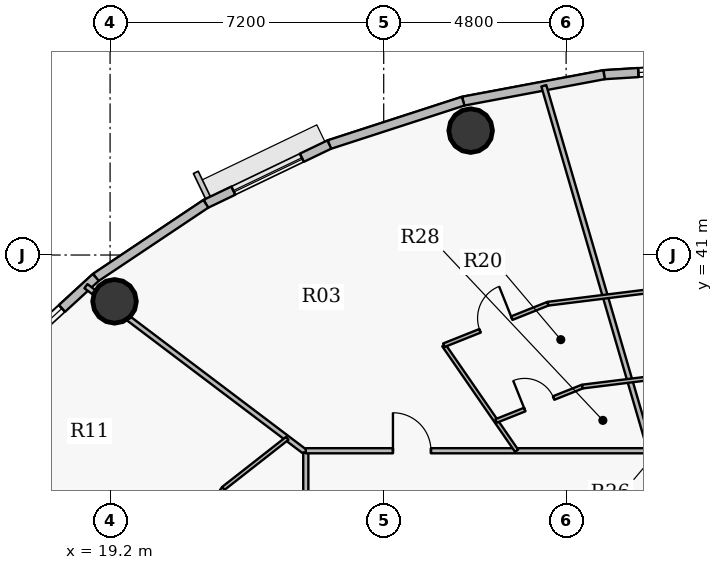
"""IFC4 building model, lengths in metres.
Left out: names, types, materials, properties, quantities, classifications, styles, units other than length and angle.
Written with IfcOpenShell. Run it as: python <this file> out.ifc"""

import sys

from ifc_helpers import new_model, si_unit, direction, frame, frame_2d, origin, origin_2d, place, context, subcontext, project, spatial, rectangle, hollow_circle, extrude, source, transform, mapped, element, fill, save


model = new_model("IFC4")
c1 = context("Model", 3, precision=1e-05, world=origin(), true_north=direction((0.0, 1.0)))
c2 = subcontext(c1, "Body", "Model", "MODEL_VIEW")
j1 = project(units=[si_unit("LENGTHUNIT", "METRE"), si_unit("PLANEANGLEUNIT", "RADIAN")], contexts=[c1])
p1 = place(None, origin())
s1 = spatial("IfcSite", under=j1, at=p1, CompositionType="ELEMENT")
p2 = place(p1, origin())
s2 = spatial("IfcBuilding", under=s1, at=p2, CompositionType="ELEMENT")
p3 = place(p2, frame((0.0, 0.0, 221.55)))
s3 = spatial("IfcBuildingStorey", under=s2, at=p3, CompositionType="ELEMENT", Elevation=221.55)
for number, where, z_axis, x_axis in (
    (1, (28.688, 44.273, 0.0), (0.0, 0.0, 1.0), (1.0, 0.0, 0.0)),
    (2, (19.317, 39.781, 0.0), (0.0, 0.0, 1.0), (1.0, 0.0, 0.0)),
):
    element("IfcColumn", number, at=place(p3, frame(where, z_axis=z_axis, x_axis=x_axis)), inside=s3, PredefinedType="COLUMN", context=c2, shape_type="SweptSolid", body=[
        extrude(hollow_circle(Radius=0.575, WallThickness=0.036, at=origin_2d()), origin(), (0.0, 0.0, 1.0), 3.75),
    ])
p4 = place(p3, frame((32.198, 45.746, 0.0), z_axis=(0.0, 0.0, 1.0), x_axis=(0.998108785312, 0.06147237333, 0.0)))
e3 = element("IfcWall", 3, at=p4, inside=s3, PredefinedType="SOLIDWALL", context=c2, shape_type="SweptSolid", body=[
    extrude(rectangle(XDim=3.809, YDim=0.24, at=frame_2d((1.904, 0.0))), origin(), (0.0, 0.0, 1.0), 3.5),
])
p5 = place(p4, frame((0.905, 0.0, 0.9)))
e4 = element("IfcOpeningElement", 4, at=p5, cuts=e3, PredefinedType="OPENING", context=c2, shape_type="SweptSolid", body=[
    extrude(rectangle(XDim=2.0, YDim=1.75, at=origin_2d()), frame((1.0, 0.13, 0.875), z_axis=(0.0, -1.0, 0.0), x_axis=(1.0, 0.0, 0.0)), (0.0, 0.0, 1.0), 0.26),
])
p6 = place(p3, frame((28.491, 45.049, 0.0), z_axis=(0.0, 0.0, 1.0), x_axis=(0.982784898575, 0.184753465822, 0.0)))
e5 = element("IfcWall", 5, at=p6, inside=s3, PredefinedType="SOLIDWALL", context=c2, shape_type="SweptSolid", body=[
    extrude(rectangle(XDim=3.773, YDim=0.24, at=frame_2d((1.886, 0.0))), origin(), (0.0, 0.0, 1.0), 3.5),
])
p7 = place(p3, frame((24.969, 43.906, 0.0), z_axis=(0.0, 0.0, 1.0), x_axis=(0.951210789182, 0.308541787354, 0.0)))
e6 = element("IfcWall", 6, at=p7, inside=s3, PredefinedType="SOLIDWALL", context=c2, shape_type="SweptSolid", body=[
    extrude(rectangle(XDim=3.702, YDim=0.24, at=frame_2d((1.851, 0.0))), origin(), (0.0, 0.0, 1.0), 3.5),
])
p8 = place(p3, frame((21.72, 42.348, 0.0), z_axis=(0.0, 0.0, 1.0), x_axis=(0.901598104751, 0.432574684313, 0.0)))
e7 = element("IfcWall", 7, at=p8, inside=s3, PredefinedType="SOLIDWALL", context=c2, shape_type="SweptSolid", body=[
    extrude(rectangle(XDim=3.604, YDim=0.24, at=frame_2d((1.802, 0.0))), origin(), (0.0, 0.0, 1.0), 3.5),
])
p9 = place(p8, frame((0.802, 0.0, 0.9)))
e8 = element("IfcOpeningElement", 8, at=p9, cuts=e7, PredefinedType="OPENING", context=c2, shape_type="SweptSolid", body=[
    extrude(rectangle(XDim=2.0, YDim=1.75, at=origin_2d()), frame((1.0, 0.13, 0.875), z_axis=(0.0, -1.0, 0.0), x_axis=(1.0, 0.0, 0.0)), (0.0, 0.0, 1.0), 0.26),
])
p10 = place(p3, frame((18.824, 40.411, 0.0), z_axis=(0.0, 0.0, 1.0), x_axis=(0.831262496074, 0.555880079352, 0.0)))
e9 = element("IfcWall", 9, at=p10, inside=s3, PredefinedType="SOLIDWALL", context=c2, shape_type="SweptSolid", body=[
    extrude(rectangle(XDim=3.484, YDim=0.24, at=frame_2d((1.742, 0.0))), origin(), (0.0, 0.0, 1.0), 3.5),
])
p11 = place(p3, frame((16.352, 38.145, 0.0), z_axis=(0.0, 0.0, 1.0), x_axis=(0.737123922599, 0.675757591694, 0.0)))
e10 = element("IfcWall", 10, at=p11, inside=s3, PredefinedType="SOLIDWALL", context=c2, shape_type="SweptSolid", body=[
    extrude(rectangle(XDim=3.354, YDim=0.24, at=frame_2d((1.677, 0.0))), origin(), (0.0, 0.0, 1.0), 3.5),
])
p12 = place(p11, frame((0.896, 0.0, 0.9)))
e11 = element("IfcOpeningElement", 11, at=p12, cuts=e10, PredefinedType="OPENING", context=c2, shape_type="SweptSolid", body=[
    extrude(rectangle(XDim=1.25, YDim=1.65, at=origin_2d()), frame((0.625, 0.13, 0.825), z_axis=(0.0, -1.0, 0.0), x_axis=(1.0, 0.0, 0.0)), (0.0, 0.0, 1.0), 0.26),
])
p13 = place(p3, frame((13.997, 34.921, 0.0), z_axis=(0.0, 0.0, 1.0), x_axis=(0.940885654064, -0.338724351023, 0.0)))
e12 = element("IfcWall", 12, at=p13, inside=s3, PredefinedType="PARTITIONING", context=c2, shape_type="SweptSolid", body=[
    extrude(rectangle(XDim=7.082, YDim=0.1, at=frame_2d((3.541, 0.0))), origin(), (0.0, 0.0, 1.0), 2.985),
])
p14 = place(p3, frame((18.565, 40.18, 0.0), z_axis=(0.0, 0.0, 1.0), x_axis=(0.797711861377, -0.603038793295, 0.0)))
e13 = element("IfcWall", 13, at=p14, inside=s3, PredefinedType="PARTITIONING", context=c2, shape_type="SweptSolid", body=[
    extrude(rectangle(XDim=7.252, YDim=0.135, at=frame_2d((3.626, 0.0))), origin(), (0.0, 0.0, 1.0), 2.935),
])
p15 = place(p3, frame((19.756, 31.133, 0.0), z_axis=(0.0, 0.0, 1.0), x_axis=(0.545406924684, 0.83817139447, 0.0)))
e14 = element("IfcWall", 14, at=p15, inside=s3, PredefinedType="PARTITIONING", context=c2, shape_type="SweptSolid", body=[
    extrude(rectangle(XDim=4.448, YDim=0.1, at=frame_2d((2.224, 0.0))), origin(), (0.0, 0.0, 1.0), 2.935),
])
p16 = place(p15, frame((2.583, 0.0, 0.0)))
e15 = element("IfcOpeningElement", 15, at=p16, cuts=e14, PredefinedType="OPENING", context=c2, shape_type="SweptSolid", body=[
    extrude(rectangle(XDim=0.9, YDim=2.1, at=origin_2d()), frame((0.45, 0.06, 1.05), z_axis=(0.0, -1.0, 0.0), x_axis=(1.0, 0.0, 0.0)), (0.0, 0.0, 1.0), 0.12),
])
p17 = place(p3, frame((22.182, 34.861, 0.0), z_axis=(0.0, 0.0, 1.0), x_axis=(0.787401156588, 0.616440928722, 0.0)))
e16 = element("IfcWall", 16, at=p17, inside=s3, PredefinedType="PARTITIONING", context=c2, shape_type="SweptSolid", body=[
    extrude(rectangle(XDim=2.134, YDim=0.1, at=frame_2d((1.067, 0.0))), origin(), (0.0, 0.0, 1.0), 2.935),
])
p18 = place(p3, frame((24.35, 27.95, 0.0), z_axis=(0.0, 0.0, 1.0), x_axis=(0.0, 1.0, 0.0)))
e17 = element("IfcWall", 17, at=p18, inside=s3, PredefinedType="PARTITIONING", context=c2, shape_type="SweptSolid", body=[
    extrude(rectangle(XDim=7.857, YDim=0.135, at=frame_2d((3.929, 0.0))), origin(), (0.0, 0.0, 1.0), 2.935),
])
p19 = place(p18, frame((3.429, 0.0, 0.0)))
e18 = element("IfcOpeningElement", 18, at=p19, cuts=e17, PredefinedType="OPENING", context=c2, shape_type="SweptSolid", body=[
    extrude(rectangle(XDim=1.0, YDim=2.15, at=origin_2d()), frame((0.5, 0.078, 1.075), z_axis=(0.0, -1.0, 0.0), x_axis=(1.0, 0.0, 0.0)), (0.0, 0.0, 1.0), 0.155),
])
p20 = place(p3, frame((24.35, 35.85, 0.0), z_axis=(0.0, 0.0, 1.0), x_axis=(1.0, 0.0, 0.0)))
e19 = element("IfcWall", 19, at=p20, inside=s3, PredefinedType="PARTITIONING", context=c2, shape_type="SweptSolid", body=[
    extrude(rectangle(XDim=26.218, YDim=0.135, at=frame_2d((13.109, 0.0))), origin(), (0.0, 0.0, 1.0), 2.935),
])
p21 = place(p20, frame((21.507, 0.0, 0.0)))
e20 = element("IfcOpeningElement", 20, at=p21, cuts=e19, PredefinedType="OPENING", context=c2, shape_type="SweptSolid", body=[
    extrude(rectangle(XDim=1.0, YDim=2.15, at=origin_2d()), frame((0.5, 0.078, 1.075), z_axis=(0.0, -1.0, 0.0), x_axis=(1.0, 0.0, 0.0)), (0.0, 0.0, 1.0), 0.155),
])
p22 = place(p20, frame((12.95, 0.0, 0.0)))
e21 = element("IfcOpeningElement", 21, at=p22, cuts=e19, PredefinedType="OPENING", context=c2, shape_type="SweptSolid", body=[
    extrude(rectangle(XDim=1.0, YDim=2.15, at=origin_2d()), frame((0.5, 0.078, 1.075), z_axis=(0.0, -1.0, 0.0), x_axis=(1.0, 0.0, 0.0)), (0.0, 0.0, 1.0), 0.155),
])
p23 = place(p20, frame((2.293, 0.0, 0.0)))
e22 = element("IfcOpeningElement", 22, at=p23, cuts=e19, PredefinedType="OPENING", context=c2, shape_type="SweptSolid", body=[
    extrude(rectangle(XDim=1.0, YDim=2.15, at=origin_2d()), frame((0.5, 0.078, 1.075), z_axis=(0.0, -1.0, 0.0), x_axis=(1.0, 0.0, 0.0)), (0.0, 0.0, 1.0), 0.155),
])
p24 = place(p3, frame((27.982, 38.626, 0.0), z_axis=(0.0, 0.0, 1.0), x_axis=(0.56776340906, -0.823191782838, 0.0)))
e23 = element("IfcWall", 23, at=p24, inside=s3, PredefinedType="PARTITIONING", context=c2, shape_type="SweptSolid", body=[
    extrude(rectangle(XDim=3.372, YDim=0.1, at=frame_2d((1.686, 0.0))), origin(), (0.0, 0.0, 1.0), 3.5),
])
p25 = place(p3, frame((27.982, 38.626, 0.0), z_axis=(0.0, 0.0, 1.0), x_axis=(0.928795965169, 0.370591493542, 0.0)))
e24 = element("IfcWall", 24, at=p25, inside=s3, PredefinedType="PARTITIONING", context=c2, shape_type="SweptSolid", body=[
    extrude(rectangle(XDim=2.95, YDim=0.1, at=frame_2d((1.475, 0.0))), origin(), (0.0, 0.0, 1.0), 2.935),
])
p26 = place(p25, frame((1.025, 0.0, 0.0)))
e25 = element("IfcOpeningElement", 25, at=p26, cuts=e24, PredefinedType="OPENING", context=c2, shape_type="SweptSolid", body=[
    extrude(rectangle(XDim=0.9, YDim=2.1, at=origin_2d()), frame((0.45, 0.06, 1.05), z_axis=(0.0, -1.0, 0.0), x_axis=(1.0, 0.0, 0.0)), (0.0, 0.0, 1.0), 0.12),
])
p27 = place(p3, frame((29.356, 36.633, 0.0), z_axis=(0.0, 0.0, 1.0), x_axis=(0.928806968298, 0.370563915731, 0.0)))
e26 = element("IfcWall", 26, at=p27, inside=s3, PredefinedType="PARTITIONING", context=c2, shape_type="SweptSolid", body=[
    extrude(rectangle(XDim=2.444, YDim=0.1, at=frame_2d((1.222, 0.0))), origin(), (0.0, 0.0, 1.0), 2.935),
])
p28 = place(p27, frame((0.812, 0.0, 0.0)))
e27 = element("IfcOpeningElement", 27, at=p28, cuts=e26, PredefinedType="OPENING", context=c2, shape_type="SweptSolid", body=[
    extrude(rectangle(XDim=0.82, YDim=2.1, at=origin_2d()), frame((0.41, 0.06, 1.05), z_axis=(0.0, -1.0, 0.0), x_axis=(1.0, 0.0, 0.0)), (0.0, 0.0, 1.0), 0.12),
])
p29 = place(p3, frame((30.613, 45.453, 0.0), z_axis=(0.0, 0.0, 1.0), x_axis=(0.280222100614, -0.959935192775, 0.0)))
e28 = element("IfcWall", 28, at=p29, inside=s3, PredefinedType="PARTITIONING", context=c2, shape_type="SweptSolid", body=[
    extrude(rectangle(XDim=10.004, YDim=0.135, at=frame_2d((5.002, 0.0))), origin(), (0.0, 0.0, 1.0), 2.985),
])
p30 = place(p3, frame((30.722, 39.719, 0.0), z_axis=(0.0, 0.0, 1.0), x_axis=(0.992398169186, 0.123068573551, 0.0)))
e29 = element("IfcWall", 29, at=p30, inside=s3, PredefinedType="PARTITIONING", context=c2, shape_type="SweptSolid", body=[
    extrude(rectangle(XDim=5.319, YDim=0.1, at=frame_2d((2.659, 0.0))), origin(), (0.0, 0.0, 1.0), 2.935),
])
p31 = place(p30, frame((2.95, 0.0, 0.0)))
e30 = element("IfcOpeningElement", 30, at=p31, cuts=e29, PredefinedType="OPENING", context=c2, shape_type="SweptSolid", body=[
    extrude(rectangle(XDim=0.9, YDim=2.1, at=origin_2d()), frame((0.45, 0.06, 1.05), z_axis=(0.0, -1.0, 0.0), x_axis=(1.0, 0.0, 0.0)), (0.0, 0.0, 1.0), 0.12),
])
p32 = place(p3, frame((31.627, 37.539, 0.0), z_axis=(0.0, 0.0, 1.0), x_axis=(0.992401810072, 0.123039210683, 0.0)))
e31 = element("IfcWall", 31, at=p32, inside=s3, PredefinedType="PARTITIONING", context=c2, shape_type="SweptSolid", body=[
    extrude(rectangle(XDim=4.407, YDim=0.1, at=frame_2d((2.204, 0.0))), origin(), (0.0, 0.0, 1.0), 2.935),
])
m1 = source(origin(), c2, "Body", "SweptSolid", [
    extrude(rectangle(XDim=2.0, YDim=1.75, at=origin_2d()), frame((1.0, 0.03, 0.875), z_axis=(0.0, -1.0, 0.0), x_axis=(1.0, 0.0, 0.0)), (0.0, 0.0, 1.0), 0.06),
])
p33 = place(p5, origin())
e32 = element("IfcWindow", 32, at=p33, inside=s3, PartitioningType="DOUBLE_PANEL_VERTICAL", PredefinedType="WINDOW", context=c2, shape_type="MappedRepresentation", body=[
    mapped(m1, transform((0.0, 0.0, 0.0), x_axis=(1.0, 0.0, 0.0), y_axis=(0.0, 1.0, 0.0), z_axis=(0.0, 0.0, 1.0), scale=1.0)),
])
fill(e4, e32)
p34 = place(p9, origin())
e33 = element("IfcWindow", 33, at=p34, inside=s3, PartitioningType="DOUBLE_PANEL_VERTICAL", PredefinedType="WINDOW", context=c2, shape_type="MappedRepresentation", body=[
    mapped(m1, transform((0.0, 0.0, 0.0), x_axis=(1.0, 0.0, 0.0), y_axis=(0.0, 1.0, 0.0), z_axis=(0.0, 0.0, 1.0), scale=1.0)),
])
fill(e8, e33)
m2 = source(origin(), c2, "Body", "SweptSolid", [
    extrude(rectangle(XDim=1.25, YDim=1.65, at=origin_2d()), frame((0.625, 0.03, 0.825), z_axis=(0.0, -1.0, 0.0), x_axis=(1.0, 0.0, 0.0)), (0.0, 0.0, 1.0), 0.06),
])
p35 = place(p12, origin())
e34 = element("IfcWindow", 34, at=p35, inside=s3, PartitioningType="SINGLE_PANEL", PredefinedType="WINDOW", context=c2, shape_type="MappedRepresentation", body=[
    mapped(m2, transform((0.0, 0.0, 0.0), x_axis=(1.0, 0.0, 0.0), y_axis=(0.0, 1.0, 0.0), z_axis=(0.0, 0.0, 1.0), scale=1.0)),
])
fill(e11, e34)
m3 = source(origin(), c2, "Body", "SweptSolid", [
    extrude(rectangle(XDim=1.0, YDim=2.15, at=origin_2d()), frame((0.5, 0.025, 1.075), z_axis=(0.0, -1.0, 0.0), x_axis=(1.0, 0.0, 0.0)), (0.0, 0.0, 1.0), 0.05),
])
p36 = place(p23, origin())
e35 = element("IfcDoor", 35, at=p36, inside=s3, OperationType="SINGLE_SWING_LEFT", PredefinedType="DOOR", context=c2, shape_type="MappedRepresentation", body=[
    mapped(m3, transform((0.0, 0.0, 0.0), x_axis=(1.0, 0.0, 0.0), y_axis=(0.0, 1.0, 0.0), z_axis=(0.0, 0.0, 1.0), scale=1.0)),
])
fill(e22, e35)
m4 = source(origin(), c2, "Body", "SweptSolid", [
    extrude(rectangle(XDim=0.9, YDim=2.1, at=origin_2d()), frame((0.45, 0.025, 1.05), z_axis=(0.0, -1.0, 0.0), x_axis=(1.0, 0.0, 0.0)), (0.0, 0.0, 1.0), 0.05),
])
p37 = place(p26, origin())
e36 = element("IfcDoor", 36, at=p37, inside=s3, OperationType="SINGLE_SWING_RIGHT", PredefinedType="DOOR", context=c2, shape_type="MappedRepresentation", body=[
    mapped(m4, transform((0.0, 0.0, 0.0), x_axis=(1.0, 0.0, 0.0), y_axis=(0.0, 1.0, 0.0), z_axis=(0.0, 0.0, 1.0), scale=1.0)),
])
fill(e25, e36)
m5 = source(origin(), c2, "Body", "SweptSolid", [
    extrude(rectangle(XDim=0.82, YDim=2.1, at=origin_2d()), frame((0.41, 0.025, 1.05), z_axis=(0.0, -1.0, 0.0), x_axis=(1.0, 0.0, 0.0)), (0.0, 0.0, 1.0), 0.05),
])
p38 = place(p28, origin())
e37 = element("IfcDoor", 37, at=p38, inside=s3, OperationType="SINGLE_SWING_LEFT", PredefinedType="DOOR", context=c2, shape_type="MappedRepresentation", body=[
    mapped(m5, transform((0.0, 0.0, 0.0), x_axis=(1.0, 0.0, 0.0), y_axis=(0.0, 1.0, 0.0), z_axis=(0.0, 0.0, 1.0), scale=1.0)),
])
fill(e27, e37)
save(model, sys.argv[1])
